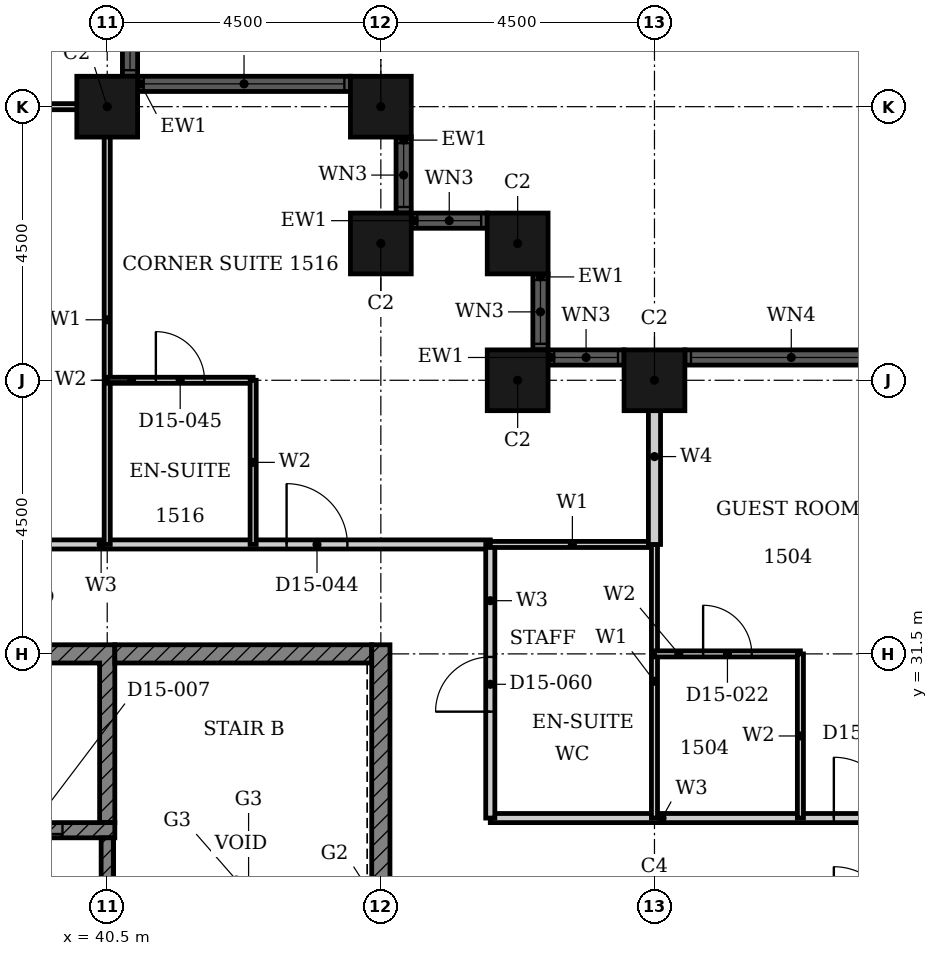
"""IFC4 building model, lengths in metres.
Left out: names, types, materials, properties, quantities, classifications, styles, units other than length and angle.
Written with IfcOpenShell. Run it as: python <this file> out.ifc"""

import sys

from ifc_helpers import new_model, si_unit, direction, frame, frame_2d, origin, origin_2d, place, context, subcontext, project, spatial, polyline, rectangle, hollow_rectangle, outline, extrude, element, fill, save


model = new_model("IFC4")
c1 = context("Model", 3, precision=1e-05, world=origin(), true_north=direction((0.0, 1.0)))
c2 = subcontext(c1, "Body", "Model", "MODEL_VIEW")
j1 = project(units=[si_unit("LENGTHUNIT", "METRE"), si_unit("PLANEANGLEUNIT", "RADIAN")], contexts=[c1])
p1 = place(None, origin())
s1 = spatial("IfcSite", under=j1, at=p1, CompositionType="ELEMENT")
p2 = place(p1, origin())
s2 = spatial("IfcBuilding", under=s1, at=p2, CompositionType="ELEMENT")
p3 = place(p2, frame((0.0, 0.0, 67.2)))
s3 = spatial("IfcBuildingStorey", under=s2, at=p3, CompositionType="ELEMENT", Elevation=67.2)
for number, where, z_axis, x_axis in (
    (1, (49.5, 36.0, 0.0), (0.0, 0.0, 1.0), (1.0, 0.0, 0.0)),
    (2, (47.25, 36.0, 0.0), (0.0, 0.0, 1.0), (1.0, 0.0, 0.0)),
    (3, (47.25, 38.25, 0.0), (0.0, 0.0, 1.0), (1.0, 0.0, 0.0)),
    (4, (45.0, 38.25, 0.0), (0.0, 0.0, 1.0), (1.0, 0.0, 0.0)),
    (5, (45.0, 40.5, 0.0), (0.0, 0.0, 1.0), (1.0, 0.0, 0.0)),
    (6, (40.5, 40.5, 0.0), (0.0, 0.0, 1.0), (1.0, 0.0, 0.0)),
):
    element("IfcColumn", number, at=place(p3, frame(where, z_axis=z_axis, x_axis=x_axis)), inside=s3, PredefinedType="COLUMN", context=c2, shape_type="SweptSolid", body=[
        extrude(hollow_rectangle(XDim=1.0, YDim=1.0, WallThickness=0.032, at=origin_2d()), origin(), (0.0, 0.0, 1.0), 3.6),
    ])
p4 = place(p3, frame((58.0, 36.375, 0.0), z_axis=(0.0, 0.0, 1.0), x_axis=(-1.0, 0.0, 0.0)))
e7 = element("IfcWall", 7, at=p4, inside=s3, PredefinedType="SOLIDWALL", context=c2, shape_type="SweptSolid", body=[
    extrude(rectangle(XDim=8.0, YDim=0.25, at=frame_2d((4.0, 0.0))), origin(), (0.0, 0.0, 1.0), 3.6),
])
p5 = place(p4, frame((0.1, 0.0, 0.9)))
e8 = element("IfcOpeningElement", 8, at=p5, cuts=e7, PredefinedType="OPENING", context=c2, shape_type="SweptSolid", body=[
    extrude(rectangle(XDim=3.3, YDim=2.08, at=frame_2d((1.65, 1.04))), frame((0.0, 0.135, 0.0), z_axis=(0.0, -1.0, 0.0), x_axis=(1.0, 0.0, 0.0)), (0.0, 0.0, 1.0), 0.27),
])
p6 = place(p4, frame((4.6, 0.0, 0.9)))
e9 = element("IfcOpeningElement", 9, at=p6, cuts=e7, PredefinedType="OPENING", context=c2, shape_type="SweptSolid", body=[
    extrude(rectangle(XDim=3.3, YDim=2.08, at=frame_2d((1.65, 1.04))), frame((0.0, 0.135, 0.0), z_axis=(0.0, -1.0, 0.0), x_axis=(1.0, 0.0, 0.0)), (0.0, 0.0, 1.0), 0.27),
])
p7 = place(p3, frame((49.0, 36.375, 0.0), z_axis=(0.0, 0.0, 1.0), x_axis=(-1.0, 0.0, 0.0)))
e10 = element("IfcWall", 10, at=p7, inside=s3, PredefinedType="SOLIDWALL", context=c2, shape_type="SweptSolid", body=[
    extrude(rectangle(XDim=1.25, YDim=0.25, at=frame_2d((0.625, 0.0))), origin(), (0.0, 0.0, 1.0), 3.6),
])
p8 = place(p7, frame((0.1, 0.0, 0.9)))
e11 = element("IfcOpeningElement", 11, at=p8, cuts=e10, PredefinedType="OPENING", context=c2, shape_type="SweptSolid", body=[
    extrude(rectangle(XDim=1.05, YDim=2.08, at=frame_2d((0.525, 1.04))), frame((0.0, 0.135, 0.0), z_axis=(0.0, -1.0, 0.0), x_axis=(1.0, 0.0, 0.0)), (0.0, 0.0, 1.0), 0.27),
])
p9 = place(p3, frame((47.625, 36.5, 0.0), z_axis=(0.0, 0.0, 1.0), x_axis=(0.0, 1.0, 0.0)))
e12 = element("IfcWall", 12, at=p9, inside=s3, PredefinedType="SOLIDWALL", context=c2, shape_type="SweptSolid", body=[
    extrude(rectangle(XDim=1.25, YDim=0.25, at=frame_2d((0.625, 0.0))), origin(), (0.0, 0.0, 1.0), 3.6),
])
p10 = place(p9, frame((0.1, 0.0, 0.9)))
e13 = element("IfcOpeningElement", 13, at=p10, cuts=e12, PredefinedType="OPENING", context=c2, shape_type="SweptSolid", body=[
    extrude(rectangle(XDim=1.05, YDim=2.08, at=frame_2d((0.525, 1.04))), frame((0.0, 0.135, 0.0), z_axis=(0.0, -1.0, 0.0), x_axis=(1.0, 0.0, 0.0)), (0.0, 0.0, 1.0), 0.27),
])
p11 = place(p3, frame((46.75, 38.625, 0.0), z_axis=(0.0, 0.0, 1.0), x_axis=(-1.0, 0.0, 0.0)))
e14 = element("IfcWall", 14, at=p11, inside=s3, PredefinedType="SOLIDWALL", context=c2, shape_type="SweptSolid", body=[
    extrude(rectangle(XDim=1.25, YDim=0.25, at=frame_2d((0.625, 0.0))), origin(), (0.0, 0.0, 1.0), 3.6),
])
p12 = place(p11, frame((0.1, 0.0, 0.9)))
e15 = element("IfcOpeningElement", 15, at=p12, cuts=e14, PredefinedType="OPENING", context=c2, shape_type="SweptSolid", body=[
    extrude(rectangle(XDim=1.05, YDim=2.08, at=frame_2d((0.525, 1.04))), frame((0.0, 0.135, 0.0), z_axis=(0.0, -1.0, 0.0), x_axis=(1.0, 0.0, 0.0)), (0.0, 0.0, 1.0), 0.27),
])
p13 = place(p3, frame((45.375, 38.75, 0.0), z_axis=(0.0, 0.0, 1.0), x_axis=(0.0, 1.0, 0.0)))
e16 = element("IfcWall", 16, at=p13, inside=s3, PredefinedType="SOLIDWALL", context=c2, shape_type="SweptSolid", body=[
    extrude(rectangle(XDim=1.25, YDim=0.25, at=frame_2d((0.625, 0.0))), origin(), (0.0, 0.0, 1.0), 3.6),
])
p14 = place(p13, frame((0.1, 0.0, 0.9)))
e17 = element("IfcOpeningElement", 17, at=p14, cuts=e16, PredefinedType="OPENING", context=c2, shape_type="SweptSolid", body=[
    extrude(rectangle(XDim=1.05, YDim=2.08, at=frame_2d((0.525, 1.04))), frame((0.0, 0.135, 0.0), z_axis=(0.0, -1.0, 0.0), x_axis=(1.0, 0.0, 0.0)), (0.0, 0.0, 1.0), 0.27),
])
p15 = place(p3, frame((44.5, 40.875, 0.0), z_axis=(0.0, 0.0, 1.0), x_axis=(-1.0, 0.0, 0.0)))
e18 = element("IfcWall", 18, at=p15, inside=s3, PredefinedType="SOLIDWALL", context=c2, shape_type="SweptSolid", body=[
    extrude(rectangle(XDim=3.5, YDim=0.25, at=frame_2d((1.75, 0.0))), origin(), (0.0, 0.0, 1.0), 3.6),
])
p16 = place(p15, frame((0.1, 0.0, 0.9)))
e19 = element("IfcOpeningElement", 19, at=p16, cuts=e18, PredefinedType="OPENING", context=c2, shape_type="SweptSolid", body=[
    extrude(rectangle(XDim=3.3, YDim=2.08, at=frame_2d((1.65, 1.04))), frame((0.0, 0.135, 0.0), z_axis=(0.0, -1.0, 0.0), x_axis=(1.0, 0.0, 0.0)), (0.0, 0.0, 1.0), 0.27),
])
p17 = place(p3, frame((40.875, 41.0, 0.0), z_axis=(0.0, 0.0, 1.0), x_axis=(0.0, 1.0, 0.0)))
e20 = element("IfcWall", 20, at=p17, inside=s3, PredefinedType="SOLIDWALL", context=c2, shape_type="SweptSolid", body=[
    extrude(rectangle(XDim=8.0, YDim=0.25, at=frame_2d((4.0, 0.0))), origin(), (0.0, 0.0, 1.0), 3.6),
])
p18 = place(p17, frame((0.1, 0.0, 0.9)))
e21 = element("IfcOpeningElement", 21, at=p18, cuts=e20, PredefinedType="OPENING", context=c2, shape_type="SweptSolid", body=[
    extrude(rectangle(XDim=3.3, YDim=2.08, at=frame_2d((1.65, 1.04))), frame((0.0, 0.135, 0.0), z_axis=(0.0, -1.0, 0.0), x_axis=(1.0, 0.0, 0.0)), (0.0, 0.0, 1.0), 0.27),
])
p19 = place(p17, frame((4.6, 0.0, 0.9)))
e22 = element("IfcOpeningElement", 22, at=p19, cuts=e20, PredefinedType="OPENING", context=c2, shape_type="SweptSolid", body=[
    extrude(rectangle(XDim=3.3, YDim=2.08, at=frame_2d((1.65, 1.04))), frame((0.0, 0.135, 0.0), z_axis=(0.0, -1.0, 0.0), x_axis=(1.0, 0.0, 0.0)), (0.0, 0.0, 1.0), 0.27),
])
p20 = place(p3, origin())
e23 = element("IfcWall", 23, at=p20, inside=s3, PredefinedType="SHEAR", context=c2, shape_type="SweptSolid", body=[
    extrude(outline(polyline([(24.947, 28.725), (25.197, 28.725), (25.197, 31.35), (27.518, 31.35), (27.518, 28.725), (27.768, 28.725), (27.768, 31.35), (30.089, 31.35), (30.089, 28.725), (30.339, 28.725), (30.339, 31.35), (32.661, 31.35), (32.661, 28.725), (32.911, 28.725), (32.911, 31.35), (35.232, 31.35), (35.232, 28.725), (35.482, 28.725), (35.482, 31.35), (37.803, 31.35), (37.803, 28.725), (38.053, 28.725), (38.053, 31.35), (40.375, 31.35), (40.375, 28.725), (40.625, 28.725), (40.625, 31.65), (24.947, 31.65), (24.947, 28.725)])), origin(), (0.0, 0.0, 1.0), 3.3),
])
p21 = place(p3, frame((40.625, 31.5, 0.0), z_axis=(0.0, 0.0, 1.0), x_axis=(1.0, 0.0, 0.0)))
e24 = element("IfcWall", 24, at=p21, inside=s3, PredefinedType="SHEAR", context=c2, shape_type="SweptSolid", body=[
    extrude(rectangle(XDim=4.225, YDim=0.3, at=frame_2d((2.113, 0.0))), origin(), (0.0, 0.0, 1.0), 3.3),
])
p22 = place(p3, frame((45.0, 22.35, 0.0), z_axis=(0.0, 0.0, 1.0), x_axis=(0.0, 1.0, 0.0)))
e25 = element("IfcWall", 25, at=p22, inside=s3, PredefinedType="SHEAR", context=c2, shape_type="SweptSolid", body=[
    extrude(rectangle(XDim=9.3, YDim=0.3, at=frame_2d((4.65, 0.0))), origin(), (0.0, 0.0, 1.0), 3.3),
])
p23 = place(p3, frame((24.947, 28.6, 0.0), z_axis=(0.0, 0.0, 1.0), x_axis=(1.0, 0.0, 0.0)))
e26 = element("IfcWall", 26, at=p23, inside=s3, PredefinedType="SHEAR", context=c2, shape_type="SweptSolid", body=[
    extrude(rectangle(XDim=15.678, YDim=0.25, at=frame_2d((7.839, 0.0))), origin(), (0.0, 0.0, 1.0), 3.3),
])
p24 = place(p23, frame((0.861, 0.0, 0.0)))
e27 = element("IfcOpeningElement", 27, at=p24, cuts=e26, PredefinedType="OPENING", context=c2, shape_type="SweptSolid", body=[
    extrude(rectangle(XDim=1.1, YDim=2.1, at=frame_2d((0.55, 1.05))), frame((0.0, 0.135, 0.0), z_axis=(0.0, -1.0, 0.0), x_axis=(1.0, 0.0, 0.0)), (0.0, 0.0, 1.0), 0.27),
])
p25 = place(p23, frame((8.575, 0.0, 0.0)))
e28 = element("IfcOpeningElement", 28, at=p25, cuts=e26, PredefinedType="OPENING", context=c2, shape_type="SweptSolid", body=[
    extrude(rectangle(XDim=1.1, YDim=2.1, at=frame_2d((0.55, 1.05))), frame((0.0, 0.135, 0.0), z_axis=(0.0, -1.0, 0.0), x_axis=(1.0, 0.0, 0.0)), (0.0, 0.0, 1.0), 0.27),
])
p26 = place(p23, frame((13.718, 0.0, 0.0)))
e29 = element("IfcOpeningElement", 29, at=p26, cuts=e26, PredefinedType="OPENING", context=c2, shape_type="SweptSolid", body=[
    extrude(rectangle(XDim=1.1, YDim=2.1, at=frame_2d((0.55, 1.05))), frame((0.0, 0.135, 0.0), z_axis=(0.0, -1.0, 0.0), x_axis=(1.0, 0.0, 0.0)), (0.0, 0.0, 1.0), 0.27),
])
p27 = place(p3, frame((40.5, 22.65, 0.0), z_axis=(0.0, 0.0, 1.0), x_axis=(0.0, 1.0, 0.0)))
e30 = element("IfcWall", 30, at=p27, inside=s3, PredefinedType="SHEAR", context=c2, shape_type="SweptSolid", body=[
    extrude(rectangle(XDim=5.825, YDim=0.2, at=frame_2d((2.913, 0.0))), origin(), (0.0, 0.0, 1.0), 3.3),
])
p28 = place(p27, frame((0.25, 0.0, 0.0)))
e31 = element("IfcOpeningElement", 31, at=p28, cuts=e30, PredefinedType="OPENING", context=c2, shape_type="SweptSolid", body=[
    extrude(rectangle(XDim=1.8, YDim=2.1, at=frame_2d((0.9, 1.05))), frame((0.0, 0.11, 0.0), z_axis=(0.0, -1.0, 0.0), x_axis=(1.0, 0.0, 0.0)), (0.0, 0.0, 1.0), 0.22),
])
p29 = place(p3, frame((46.8, 28.8, 0.0), z_axis=(0.0, 0.0, 1.0), x_axis=(1.0, 0.0, 0.0)))
e32 = element("IfcWall", 32, at=p29, inside=s3, PredefinedType="PARTITIONING", context=c2, shape_type="SweptSolid", body=[
    extrude(rectangle(XDim=7.2, YDim=0.15, at=frame_2d((3.6, 0.0))), origin(), (0.0, 0.0, 1.0), 3.3),
])
p30 = place(p29, frame((5.65, 0.0, 0.0)))
e33 = element("IfcOpeningElement", 33, at=p30, cuts=e32, PredefinedType="OPENING", context=c2, shape_type="SweptSolid", body=[
    extrude(rectangle(XDim=1.0, YDim=2.1, at=frame_2d((0.5, 1.05))), frame((0.0, 0.085, 0.0), z_axis=(0.0, -1.0, 0.0), x_axis=(1.0, 0.0, 0.0)), (0.0, 0.0, 1.0), 0.17),
])
p31 = place(p3, frame((33.3, 33.3, 0.0), z_axis=(0.0, 0.0, 1.0), x_axis=(1.0, 0.0, 0.0)))
e34 = element("IfcWall", 34, at=p31, inside=s3, PredefinedType="PARTITIONING", context=c2, shape_type="SweptSolid", body=[
    extrude(rectangle(XDim=13.5, YDim=0.15, at=frame_2d((6.75, 0.0))), origin(), (0.0, 0.0, 1.0), 3.3),
])
p32 = place(p31, frame((10.15, 0.0, 0.0)))
e35 = element("IfcOpeningElement", 35, at=p32, cuts=e34, PredefinedType="OPENING", context=c2, shape_type="SweptSolid", body=[
    extrude(rectangle(XDim=1.0, YDim=2.1, at=frame_2d((0.5, 1.05))), frame((0.0, 0.085, 0.0), z_axis=(0.0, -1.0, 0.0), x_axis=(1.0, 0.0, 0.0)), (0.0, 0.0, 1.0), 0.17),
])
p33 = place(p31, frame((3.15, 0.0, 0.0)))
e36 = element("IfcOpeningElement", 36, at=p33, cuts=e34, PredefinedType="OPENING", context=c2, shape_type="SweptSolid", body=[
    extrude(rectangle(XDim=0.9, YDim=2.1, at=frame_2d((0.45, 1.05))), frame((0.0, 0.085, 0.0), z_axis=(0.0, -1.0, 0.0), x_axis=(1.0, 0.0, 0.0)), (0.0, 0.0, 1.0), 0.17),
])
p34 = place(p3, frame((46.8, 28.8, 0.0), z_axis=(0.0, 0.0, 1.0), x_axis=(0.0, 1.0, 0.0)))
e37 = element("IfcWall", 37, at=p34, inside=s3, PredefinedType="PARTITIONING", context=c2, shape_type="SweptSolid", body=[
    extrude(rectangle(XDim=4.5, YDim=0.15, at=frame_2d((2.25, 0.0))), origin(), (0.0, 0.0, 1.0), 3.3),
])
p35 = place(p34, frame((1.75, 0.0, 0.0)))
e38 = element("IfcOpeningElement", 38, at=p35, cuts=e37, PredefinedType="OPENING", context=c2, shape_type="SweptSolid", body=[
    extrude(rectangle(XDim=0.9, YDim=2.1, at=frame_2d((0.45, 1.05))), frame((0.0, 0.085, 0.0), z_axis=(0.0, -1.0, 0.0), x_axis=(1.0, 0.0, 0.0)), (0.0, 0.0, 1.0), 0.17),
])
p36 = place(p3, frame((46.8, 33.3, 0.0), z_axis=(0.0, 0.0, 1.0), x_axis=(1.0, 0.0, 0.0)))
e39 = element("IfcWall", 39, at=p36, inside=s3, PredefinedType="PARTITIONING", context=c2, shape_type="SweptSolid", body=[
    extrude(rectangle(XDim=2.7, YDim=0.1, at=frame_2d((1.35, 0.0))), origin(), (0.0, 0.0, 1.0), 3.3),
])
p37 = place(p3, frame((33.3, 40.5, 0.0), z_axis=(0.0, 0.0, 1.0), x_axis=(1.0, 0.0, 0.0)))
e40 = element("IfcWall", 40, at=p37, inside=s3, PredefinedType="PARTITIONING", context=c2, shape_type="SweptSolid", body=[
    extrude(rectangle(XDim=7.39, YDim=0.1, at=frame_2d((3.695, 0.0))), origin(), (0.0, 0.0, 1.0), 2.38),
])
p38 = place(p3, frame((40.5, 33.3, 0.0), z_axis=(0.0, 0.0, 1.0), x_axis=(0.0, 1.0, 0.0)))
e41 = element("IfcWall", 41, at=p38, inside=s3, PredefinedType="PARTITIONING", context=c2, shape_type="SweptSolid", body=[
    extrude(rectangle(XDim=7.39, YDim=0.1, at=frame_2d((3.695, 0.0))), origin(), (0.0, 0.0, 1.0), 3.3),
])
p39 = place(p3, frame((49.5, 28.8, 0.0), z_axis=(0.0, 0.0, 1.0), x_axis=(0.0, 1.0, 0.0)))
e42 = element("IfcWall", 42, at=p39, inside=s3, PredefinedType="PARTITIONING", context=c2, shape_type="SweptSolid", body=[
    extrude(rectangle(XDim=4.5, YDim=0.1, at=frame_2d((2.25, 0.0))), origin(), (0.0, 0.0, 1.0), 2.38),
])
p40 = place(p3, frame((49.5, 33.3, 0.0), z_axis=(0.0, 0.0, 1.0), x_axis=(0.0, 1.0, 0.0)))
e43 = element("IfcWall", 43, at=p40, inside=s3, PredefinedType="PARTITIONING", context=c2, shape_type="SweptSolid", body=[
    extrude(rectangle(XDim=2.89, YDim=0.2, at=frame_2d((1.445, 0.0))), origin(), (0.0, 0.0, 1.0), 2.38),
])
p41 = place(p3, frame((49.5, 31.5, 0.0), z_axis=(0.0, 0.0, 1.0), x_axis=(1.0, 0.0, 0.0)))
e44 = element("IfcWall", 44, at=p41, inside=s3, PredefinedType="PARTITIONING", context=c2, shape_type="SweptSolid", body=[
    extrude(rectangle(XDim=2.4, YDim=0.1, at=frame_2d((1.2, 0.0))), origin(), (0.0, 0.0, 1.0), 2.58),
])
p42 = place(p41, frame((0.8, 0.0, 0.0)))
e45 = element("IfcOpeningElement", 45, at=p42, cuts=e44, PredefinedType="OPENING", context=c2, shape_type="SweptSolid", body=[
    extrude(rectangle(XDim=0.8, YDim=2.1, at=frame_2d((0.4, 1.05))), frame((0.0, 0.06, 0.0), z_axis=(0.0, -1.0, 0.0), x_axis=(1.0, 0.0, 0.0)), (0.0, 0.0, 1.0), 0.12),
])
p43 = place(p3, frame((40.5, 36.0, 0.0), z_axis=(0.0, 0.0, 1.0), x_axis=(1.0, 0.0, 0.0)))
e46 = element("IfcWall", 46, at=p43, inside=s3, PredefinedType="PARTITIONING", context=c2, shape_type="SweptSolid", body=[
    extrude(rectangle(XDim=2.4, YDim=0.1, at=frame_2d((1.2, 0.0))), origin(), (0.0, 0.0, 1.0), 3.3),
])
p44 = place(p43, frame((0.8, 0.0, 0.0)))
e47 = element("IfcOpeningElement", 47, at=p44, cuts=e46, PredefinedType="OPENING", context=c2, shape_type="SweptSolid", body=[
    extrude(rectangle(XDim=0.8, YDim=2.1, at=frame_2d((0.4, 1.05))), frame((0.0, 0.06, 0.0), z_axis=(0.0, -1.0, 0.0), x_axis=(1.0, 0.0, 0.0)), (0.0, 0.0, 1.0), 0.12),
])
for number, where, z_axis, x_axis in (
    (48, (42.9, 33.3, 0.0), (0.0, 0.0, 1.0), (0.0, 1.0, 0.0)),
    (49, (51.9, 28.8, 0.0), (0.0, 0.0, 1.0), (0.0, 1.0, 0.0)),
):
    element("IfcWall", number, at=place(p3, frame(where, z_axis=z_axis, x_axis=x_axis)), inside=s3, PredefinedType="PARTITIONING", context=c2, shape_type="SweptSolid", body=[
        extrude(rectangle(XDim=2.7, YDim=0.1, at=frame_2d((1.35, 0.0))), origin(), (0.0, 0.0, 1.0), 3.3),
    ])
p45 = place(p6, origin())
e50 = element("IfcWindow", 50, at=p45, inside=s3, PartitioningType="SINGLE_PANEL", PredefinedType="WINDOW", context=c2, shape_type="SweptSolid", body=[
    extrude(rectangle(XDim=3.3, YDim=2.08, at=frame_2d((1.65, 1.04))), frame((0.0, 0.03, 0.0), z_axis=(0.0, -1.0, 0.0), x_axis=(1.0, 0.0, 0.0)), (0.0, 0.0, 1.0), 0.06),
])
fill(e9, e50)
p46 = place(p8, origin())
e51 = element("IfcWindow", 51, at=p46, inside=s3, PartitioningType="SINGLE_PANEL", PredefinedType="WINDOW", context=c2, shape_type="SweptSolid", body=[
    extrude(rectangle(XDim=1.05, YDim=2.08, at=frame_2d((0.525, 1.04))), frame((0.0, 0.03, 0.0), z_axis=(0.0, -1.0, 0.0), x_axis=(1.0, 0.0, 0.0)), (0.0, 0.0, 1.0), 0.06),
])
fill(e11, e51)
p47 = place(p10, origin())
e52 = element("IfcWindow", 52, at=p47, inside=s3, PartitioningType="SINGLE_PANEL", PredefinedType="WINDOW", context=c2, shape_type="SweptSolid", body=[
    extrude(rectangle(XDim=1.05, YDim=2.08, at=frame_2d((0.525, 1.04))), frame((0.0, 0.03, 0.0), z_axis=(0.0, -1.0, 0.0), x_axis=(1.0, 0.0, 0.0)), (0.0, 0.0, 1.0), 0.06),
])
fill(e13, e52)
p48 = place(p12, origin())
e53 = element("IfcWindow", 53, at=p48, inside=s3, PartitioningType="SINGLE_PANEL", PredefinedType="WINDOW", context=c2, shape_type="SweptSolid", body=[
    extrude(rectangle(XDim=1.05, YDim=2.08, at=frame_2d((0.525, 1.04))), frame((0.0, 0.03, 0.0), z_axis=(0.0, -1.0, 0.0), x_axis=(1.0, 0.0, 0.0)), (0.0, 0.0, 1.0), 0.06),
])
fill(e15, e53)
p49 = place(p14, origin())
e54 = element("IfcWindow", 54, at=p49, inside=s3, PartitioningType="SINGLE_PANEL", PredefinedType="WINDOW", context=c2, shape_type="SweptSolid", body=[
    extrude(rectangle(XDim=1.05, YDim=2.08, at=frame_2d((0.525, 1.04))), frame((0.0, 0.03, 0.0), z_axis=(0.0, -1.0, 0.0), x_axis=(1.0, 0.0, 0.0)), (0.0, 0.0, 1.0), 0.06),
])
fill(e17, e54)
p50 = place(p16, origin())
e55 = element("IfcWindow", 55, at=p50, inside=s3, PartitioningType="SINGLE_PANEL", PredefinedType="WINDOW", context=c2, shape_type="SweptSolid", body=[
    extrude(rectangle(XDim=3.3, YDim=2.08, at=frame_2d((1.65, 1.04))), frame((0.0, 0.03, 0.0), z_axis=(0.0, -1.0, 0.0), x_axis=(1.0, 0.0, 0.0)), (0.0, 0.0, 1.0), 0.06),
])
fill(e19, e55)
p51 = place(p18, origin())
e56 = element("IfcWindow", 56, at=p51, inside=s3, PartitioningType="SINGLE_PANEL", PredefinedType="WINDOW", context=c2, shape_type="SweptSolid", body=[
    extrude(rectangle(XDim=3.3, YDim=2.08, at=frame_2d((1.65, 1.04))), frame((0.0, 0.03, 0.0), z_axis=(0.0, -1.0, 0.0), x_axis=(1.0, 0.0, 0.0)), (0.0, 0.0, 1.0), 0.06),
])
fill(e21, e56)
p52 = place(p26, origin())
e57 = element("IfcDoor", 57, at=p52, inside=s3, OperationType="DOUBLE_DOOR_SLIDING", PredefinedType="DOOR", context=c2, shape_type="SweptSolid", body=[
    extrude(rectangle(XDim=1.1, YDim=2.1, at=frame_2d((0.55, 1.05))), frame((0.0, 0.025, 0.0), z_axis=(0.0, -1.0, 0.0), x_axis=(1.0, 0.0, 0.0)), (0.0, 0.0, 1.0), 0.05),
])
fill(e29, e57)
p53 = place(p30, origin())
e58 = element("IfcDoor", 58, at=p53, inside=s3, OperationType="SINGLE_SWING_RIGHT", PredefinedType="DOOR", context=c2, shape_type="SweptSolid", body=[
    extrude(rectangle(XDim=1.0, YDim=2.1, at=frame_2d((0.5, 1.05))), frame((0.0, 0.025, 0.0), z_axis=(0.0, -1.0, 0.0), x_axis=(1.0, 0.0, 0.0)), (0.0, 0.0, 1.0), 0.05),
])
fill(e33, e58)
p54 = place(p42, origin())
e59 = element("IfcDoor", 59, at=p54, inside=s3, OperationType="SINGLE_SWING_RIGHT", PredefinedType="DOOR", context=c2, shape_type="SweptSolid", body=[
    extrude(rectangle(XDim=0.8, YDim=2.1, at=frame_2d((0.4, 1.05))), frame((0.0, 0.025, 0.0), z_axis=(0.0, -1.0, 0.0), x_axis=(1.0, 0.0, 0.0)), (0.0, 0.0, 1.0), 0.05),
])
fill(e45, e59)
p55 = place(p32, origin())
e60 = element("IfcDoor", 60, at=p55, inside=s3, OperationType="SINGLE_SWING_RIGHT", PredefinedType="DOOR", context=c2, shape_type="SweptSolid", body=[
    extrude(rectangle(XDim=1.0, YDim=2.1, at=frame_2d((0.5, 1.05))), frame((0.0, 0.025, 0.0), z_axis=(0.0, -1.0, 0.0), x_axis=(1.0, 0.0, 0.0)), (0.0, 0.0, 1.0), 0.05),
])
fill(e35, e60)
p56 = place(p44, origin())
e61 = element("IfcDoor", 61, at=p56, inside=s3, OperationType="SINGLE_SWING_RIGHT", PredefinedType="DOOR", context=c2, shape_type="SweptSolid", body=[
    extrude(rectangle(XDim=0.8, YDim=2.1, at=frame_2d((0.4, 1.05))), frame((0.0, 0.025, 0.0), z_axis=(0.0, -1.0, 0.0), x_axis=(1.0, 0.0, 0.0)), (0.0, 0.0, 1.0), 0.05),
])
fill(e47, e61)
p57 = place(p35, origin())
e62 = element("IfcDoor", 62, at=p57, inside=s3, OperationType="SINGLE_SWING_LEFT", PredefinedType="DOOR", context=c2, shape_type="SweptSolid", body=[
    extrude(rectangle(XDim=0.9, YDim=2.1, at=frame_2d((0.45, 1.05))), frame((0.0, 0.025, 0.0), z_axis=(0.0, -1.0, 0.0), x_axis=(1.0, 0.0, 0.0)), (0.0, 0.0, 1.0), 0.05),
])
fill(e38, e62)
save(model, sys.argv[1])
